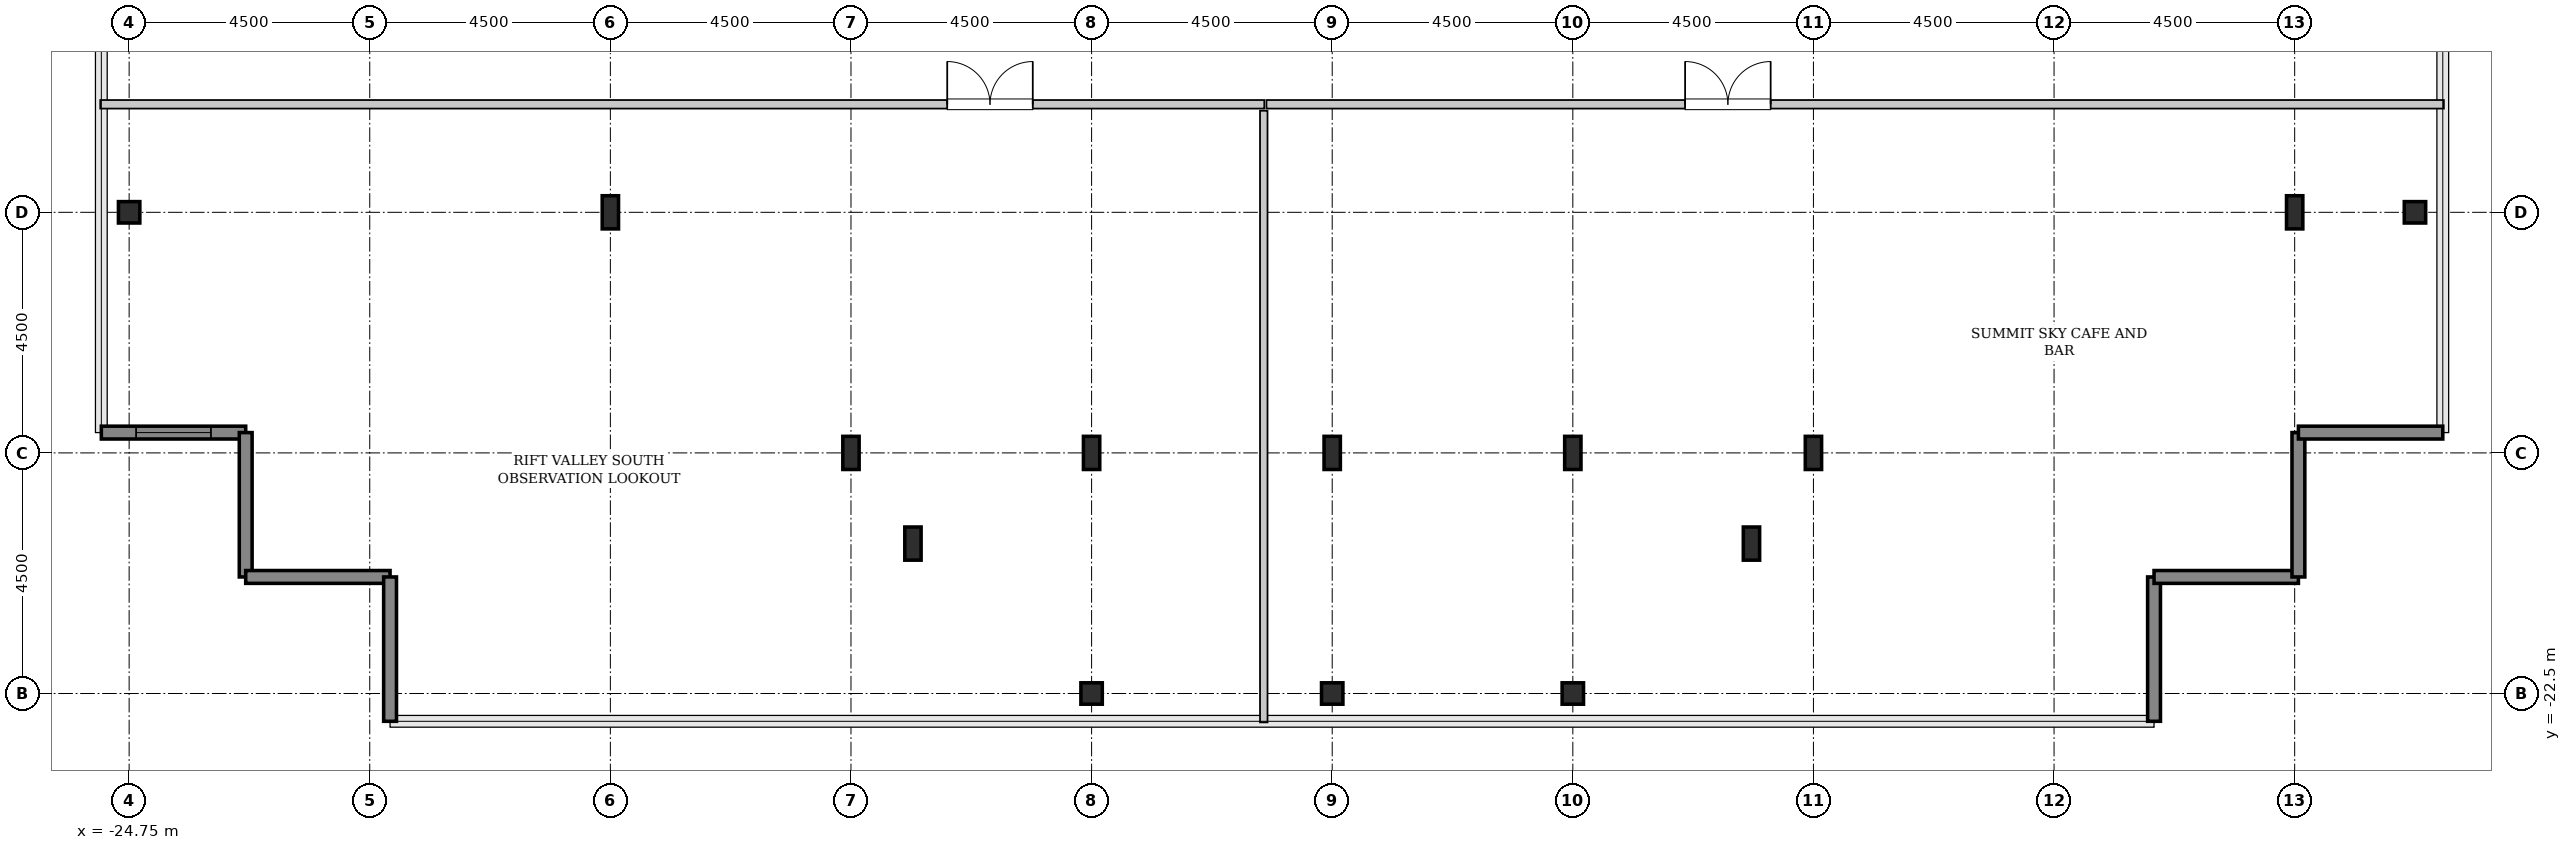
"""IFC4 building model, lengths in metres.
Left out: names, types, materials, properties, quantities, classifications, styles, units other than length and angle.
Written with IfcOpenShell. Run it as: python <this file> out.ifc"""

import sys

from ifc_helpers import new_model, si_unit, direction, frame, frame_2d, origin, origin_2d, place, context, subcontext, project, spatial, rectangle, hollow_rectangle, i_section, extrude, source, transform, mapped, element, fill, save


model = new_model("IFC4")
c1 = context("Model", 3, precision=1e-05, world=origin(), true_north=direction((0.0, 1.0)))
c2 = subcontext(c1, "Body", "Model", "MODEL_VIEW")
j1 = project(units=[si_unit("LENGTHUNIT", "METRE"), si_unit("PLANEANGLEUNIT", "RADIAN")], contexts=[c1])
p1 = place(None, origin())
s1 = spatial("IfcSite", under=j1, at=p1, CompositionType="ELEMENT")
p2 = place(p1, origin())
s2 = spatial("IfcBuilding", under=s1, at=p2, CompositionType="ELEMENT")
p3 = place(p2, frame((0.0, 0.0, 353.8)))
s3 = spatial("IfcBuildingStorey", under=s2, at=p3, CompositionType="ELEMENT", Elevation=353.8)
m1 = source(origin(), c2, "Body", "SweptSolid", [
    extrude(hollow_rectangle(XDim=0.4, YDim=0.4, WallThickness=0.02, InnerFilletRadius=0.02, OuterFilletRadius=0.04, at=origin_2d()), origin(), (0.0, 0.0, 1.0), 4.8),
])
p4 = place(p3, frame((-24.75, -13.5, 0.0), z_axis=(0.0, 0.0, 1.0), x_axis=(1.0, 0.0, 0.0)))
e1 = element("IfcColumn", 1, at=p4, inside=s3, PredefinedType="COLUMN", context=c2, shape_type="MappedRepresentation", body=[
    mapped(m1, transform((0.0, 0.0, 0.0), x_axis=(1.0, 0.0, 0.0), y_axis=(0.0, 1.0, 0.0), z_axis=(0.0, 0.0, 1.0), scale=1.0)),
])
m2 = source(origin(), c2, "Body", "SweptSolid", [
    extrude(i_section(OverallWidth=0.305, OverallDepth=0.62, WebThickness=0.021, FlangeThickness=0.04, FilletRadius=0.027, at=origin_2d()), origin(), (0.0, 0.0, 1.0), 4.8),
])
for number, where, z_axis, x_axis in (
    (2, (-15.75, -13.5, 0.0), (0.0, 0.0, 1.0), (1.0, 0.0, 0.0)),
    (3, (-11.25, -18.0, 0.0), (0.0, 0.0, 1.0), (1.0, 0.0, 0.0)),
    (4, (-10.091, -19.696, 0.0), (0.0, 0.0, 1.0), (1.0, 0.0, 0.0)),
):
    element("IfcColumn", number, at=place(p3, frame(where, z_axis=z_axis, x_axis=x_axis)), inside=s3, PredefinedType="COLUMN", context=c2, shape_type="MappedRepresentation", body=[
        mapped(m2, transform((0.0, 0.0, 0.0), x_axis=(1.0, 0.0, 0.0), y_axis=(0.0, 1.0, 0.0), z_axis=(0.0, 0.0, 1.0), scale=1.0)),
    ])
p5 = place(p3, frame((-6.75, -22.5, 0.0), z_axis=(0.0, 0.0, 1.0), x_axis=(1.0, 0.0, 0.0)))
e5 = element("IfcColumn", 5, at=p5, inside=s3, PredefinedType="COLUMN", context=c2, shape_type="MappedRepresentation", body=[
    mapped(m1, transform((0.0, 0.0, 0.0), x_axis=(1.0, 0.0, 0.0), y_axis=(0.0, 1.0, 0.0), z_axis=(0.0, 0.0, 1.0), scale=1.0)),
])
p6 = place(p3, frame((-6.75, -18.0, 0.0), z_axis=(0.0, 0.0, 1.0), x_axis=(1.0, 0.0, 0.0)))
e6 = element("IfcColumn", 6, at=p6, inside=s3, PredefinedType="COLUMN", context=c2, shape_type="MappedRepresentation", body=[
    mapped(m2, transform((0.0, 0.0, 0.0), x_axis=(1.0, 0.0, 0.0), y_axis=(0.0, 1.0, 0.0), z_axis=(0.0, 0.0, 1.0), scale=1.0)),
])
p7 = place(p3, frame((-2.25, -22.5, 0.0), z_axis=(0.0, 0.0, 1.0), x_axis=(1.0, 0.0, 0.0)))
e7 = element("IfcColumn", 7, at=p7, inside=s3, PredefinedType="COLUMN", context=c2, shape_type="MappedRepresentation", body=[
    mapped(m1, transform((0.0, 0.0, 0.0), x_axis=(1.0, 0.0, 0.0), y_axis=(0.0, 1.0, 0.0), z_axis=(0.0, 0.0, 1.0), scale=1.0)),
])
p8 = place(p3, frame((-2.25, -18.0, 0.0), z_axis=(0.0, 0.0, 1.0), x_axis=(1.0, 0.0, 0.0)))
e8 = element("IfcColumn", 8, at=p8, inside=s3, PredefinedType="COLUMN", context=c2, shape_type="MappedRepresentation", body=[
    mapped(m2, transform((0.0, 0.0, 0.0), x_axis=(1.0, 0.0, 0.0), y_axis=(0.0, 1.0, 0.0), z_axis=(0.0, 0.0, 1.0), scale=1.0)),
])
p9 = place(p3, frame((2.25, -22.5, 0.0), z_axis=(0.0, 0.0, 1.0), x_axis=(1.0, 0.0, 0.0)))
e9 = element("IfcColumn", 9, at=p9, inside=s3, PredefinedType="COLUMN", context=c2, shape_type="MappedRepresentation", body=[
    mapped(m1, transform((0.0, 0.0, 0.0), x_axis=(1.0, 0.0, 0.0), y_axis=(0.0, 1.0, 0.0), z_axis=(0.0, 0.0, 1.0), scale=1.0)),
])
for number, where, z_axis, x_axis in (
    (10, (2.25, -18.0, 0.0), (0.0, 0.0, 1.0), (1.0, 0.0, 0.0)),
    (11, (5.591, -19.696, 0.0), (0.0, 0.0, 1.0), (1.0, 0.0, 0.0)),
    (12, (6.75, -18.0, 0.0), (0.0, 0.0, 1.0), (1.0, 0.0, 0.0)),
    (13, (15.75, -13.5, 0.0), (0.0, 0.0, 1.0), (1.0, 0.0, 0.0)),
):
    element("IfcColumn", number, at=place(p3, frame(where, z_axis=z_axis, x_axis=x_axis)), inside=s3, PredefinedType="COLUMN", context=c2, shape_type="MappedRepresentation", body=[
        mapped(m2, transform((0.0, 0.0, 0.0), x_axis=(1.0, 0.0, 0.0), y_axis=(0.0, 1.0, 0.0), z_axis=(0.0, 0.0, 1.0), scale=1.0)),
    ])
p10 = place(p3, frame((18.0, -13.5, 0.0), z_axis=(0.0, 0.0, 1.0), x_axis=(1.0, 0.0, 0.0)))
e14 = element("IfcColumn", 14, at=p10, inside=s3, PredefinedType="COLUMN", context=c2, shape_type="MappedRepresentation", body=[
    mapped(m1, transform((0.0, 0.0, 0.0), x_axis=(1.0, 0.0, 0.0), y_axis=(0.0, 1.0, 0.0), z_axis=(0.0, 0.0, 1.0), scale=1.0)),
])
m3 = source(origin(), c2, "Body", "SweptSolid", [
    extrude(rectangle(XDim=2.7, YDim=0.24, at=frame_2d((1.35, 0.0))), origin(), (0.0, 0.0, 1.0), 4.5),
])
p11 = place(p3, frame((-25.27, -17.62, 0.0), z_axis=(0.0, 0.0, 1.0), x_axis=(1.0, 0.0, 0.0)))
e15 = element("IfcWall", 15, at=p11, inside=s3, PredefinedType="SHEAR", context=c2, shape_type="MappedRepresentation", body=[
    mapped(m3, transform((0.0, 0.0, 0.0), x_axis=(1.0, 0.0, 0.0), y_axis=(0.0, 1.0, 0.0), z_axis=(0.0, 0.0, 1.0), scale=1.0)),
])
p12 = place(p11, frame((0.65, 0.0, 0.85)))
e16 = element("IfcOpeningElement", 16, at=p12, cuts=e15, PredefinedType="OPENING", context=c2, shape_type="SweptSolid", body=[
    extrude(rectangle(XDim=1.4, YDim=1.8, at=frame_2d((0.7, 0.9))), frame((0.0, 0.13, 0.0), z_axis=(0.0, -1.0, 0.0), x_axis=(1.0, 0.0, 0.0)), (0.0, 0.0, 1.0), 0.26),
])
for number, where, z_axis, x_axis in (
    (17, (-22.57, -17.62, 0.0), (0.0, 0.0, 1.0), (0.0, -1.0, 0.0)),
    (18, (-22.57, -20.32, 0.0), (0.0, 0.0, 1.0), (1.0, 0.0, 0.0)),
    (19, (-19.87, -20.32, 0.0), (0.0, 0.0, 1.0), (0.0, -1.0, 0.0)),
    (20, (13.12, -23.02, 0.0), (0.0, 0.0, 1.0), (0.0, 1.0, 0.0)),
    (21, (13.12, -20.32, 0.0), (0.0, 0.0, 1.0), (1.0, 0.0, 0.0)),
    (22, (15.82, -20.32, 0.0), (0.0, 0.0, 1.0), (0.0, 1.0, 0.0)),
    (23, (15.82, -17.62, 0.0), (0.0, 0.0, 1.0), (1.0, 0.0, 0.0)),
):
    element("IfcWall", number, at=place(p3, frame(where, z_axis=z_axis, x_axis=x_axis)), inside=s3, PredefinedType="SHEAR", context=c2, shape_type="MappedRepresentation", body=[
        mapped(m3, transform((0.0, 0.0, 0.0), x_axis=(1.0, 0.0, 0.0), y_axis=(0.0, 1.0, 0.0), z_axis=(0.0, 0.0, 1.0), scale=1.0)),
    ])
m4 = source(origin(), c2, "Body", "SweptSolid", [
    extrude(rectangle(XDim=21.77, YDim=0.16, at=frame_2d((10.885, 0.0))), origin(), (0.0, 0.0, 1.0), 4.485),
])
p13 = place(p3, frame((-25.29, -11.48, 0.0), z_axis=(0.0, 0.0, 1.0), x_axis=(1.0, 0.0, 0.0)))
e24 = element("IfcWall", 24, at=p13, inside=s3, PredefinedType="PARTITIONING", context=c2, shape_type="MappedRepresentation", body=[
    mapped(m4, transform((0.0, 0.0, 0.0), x_axis=(1.0, 0.0, 0.0), y_axis=(0.0, 1.0, 0.0), z_axis=(0.0, 0.0, 1.0), scale=1.0)),
])
p14 = place(p13, frame((15.84, 0.0, 0.0)))
e25 = element("IfcOpeningElement", 25, at=p14, cuts=e24, PredefinedType="OPENING", context=c2, shape_type="SweptSolid", body=[
    extrude(rectangle(XDim=1.6, YDim=2.3, at=frame_2d((0.8, 1.15))), frame((0.0, 0.09, 0.0), z_axis=(0.0, -1.0, 0.0), x_axis=(1.0, 0.0, 0.0)), (0.0, 0.0, 1.0), 0.18),
])
m5 = source(origin(), c2, "Body", "SweptSolid", [
    extrude(rectangle(XDim=11.44, YDim=0.14, at=frame_2d((5.72, 0.0))), origin(), (0.0, 0.0, 1.0), 4.485),
])
p15 = place(p3, frame((-3.53, -23.04, 0.0), z_axis=(0.0, 0.0, 1.0), x_axis=(0.0, 1.0, 0.0)))
e26 = element("IfcWall", 26, at=p15, inside=s3, PredefinedType="PARTITIONING", context=c2, shape_type="MappedRepresentation", body=[
    mapped(m5, transform((0.0, 0.0, 0.0), x_axis=(1.0, 0.0, 0.0), y_axis=(0.0, 1.0, 0.0), z_axis=(0.0, 0.0, 1.0), scale=1.0)),
])
m6 = source(origin(), c2, "Body", "SweptSolid", [
    extrude(rectangle(XDim=22.02, YDim=0.16, at=frame_2d((11.01, 0.0))), origin(), (0.0, 0.0, 1.0), 4.485),
])
p16 = place(p3, frame((-3.48, -11.48, 0.0), z_axis=(0.0, 0.0, 1.0), x_axis=(1.0, 0.0, 0.0)))
e27 = element("IfcWall", 27, at=p16, inside=s3, PredefinedType="PARTITIONING", context=c2, shape_type="MappedRepresentation", body=[
    mapped(m6, transform((0.0, 0.0, 0.0), x_axis=(1.0, 0.0, 0.0), y_axis=(0.0, 1.0, 0.0), z_axis=(0.0, 0.0, 1.0), scale=1.0)),
])
p17 = place(p16, frame((7.83, 0.0, 0.0)))
e28 = element("IfcOpeningElement", 28, at=p17, cuts=e27, PredefinedType="OPENING", context=c2, shape_type="SweptSolid", body=[
    extrude(rectangle(XDim=1.6, YDim=2.3, at=frame_2d((0.8, 1.15))), frame((0.0, 0.09, 0.0), z_axis=(0.0, -1.0, 0.0), x_axis=(1.0, 0.0, 0.0)), (0.0, 0.0, 1.0), 0.18),
])
m7 = source(origin(), c2, "Body", "SweptSolid", [
    extrude(rectangle(XDim=1.4, YDim=1.8, at=frame_2d((0.7, 0.9))), frame((0.0, 0.03, 0.0), z_axis=(0.0, -1.0, 0.0), x_axis=(1.0, 0.0, 0.0)), (0.0, 0.0, 1.0), 0.06),
])
p18 = place(p12, origin())
e29 = element("IfcWindow", 29, at=p18, inside=s3, PartitioningType="SINGLE_PANEL", PredefinedType="WINDOW", context=c2, shape_type="MappedRepresentation", body=[
    mapped(m7, transform((0.0, 0.0, 0.0), x_axis=(1.0, 0.0, 0.0), y_axis=(0.0, 1.0, 0.0), z_axis=(0.0, 0.0, 1.0), scale=1.0)),
])
fill(e16, e29)
m8 = source(origin(), c2, "Body", "SweptSolid", [
    extrude(rectangle(XDim=1.6, YDim=2.3, at=frame_2d((0.8, 1.15))), frame((0.0, 0.025, 0.0), z_axis=(0.0, -1.0, 0.0), x_axis=(1.0, 0.0, 0.0)), (0.0, 0.0, 1.0), 0.05),
])
p19 = place(p14, origin())
e30 = element("IfcDoor", 30, at=p19, inside=s3, OperationType="DOUBLE_DOOR_SINGLE_SWING", PredefinedType="DOOR", context=c2, shape_type="MappedRepresentation", body=[
    mapped(m8, transform((0.0, 0.0, 0.0), x_axis=(1.0, 0.0, 0.0), y_axis=(0.0, 1.0, 0.0), z_axis=(0.0, 0.0, 1.0), scale=1.0)),
])
fill(e25, e30)
p20 = place(p17, origin())
e31 = element("IfcDoor", 31, at=p20, inside=s3, OperationType="DOUBLE_DOOR_SINGLE_SWING", PredefinedType="DOOR", context=c2, shape_type="MappedRepresentation", body=[
    mapped(m8, transform((0.0, 0.0, 0.0), x_axis=(1.0, 0.0, 0.0), y_axis=(0.0, 1.0, 0.0), z_axis=(0.0, 0.0, 1.0), scale=1.0)),
])
fill(e28, e31)
save(model, sys.argv[1])
